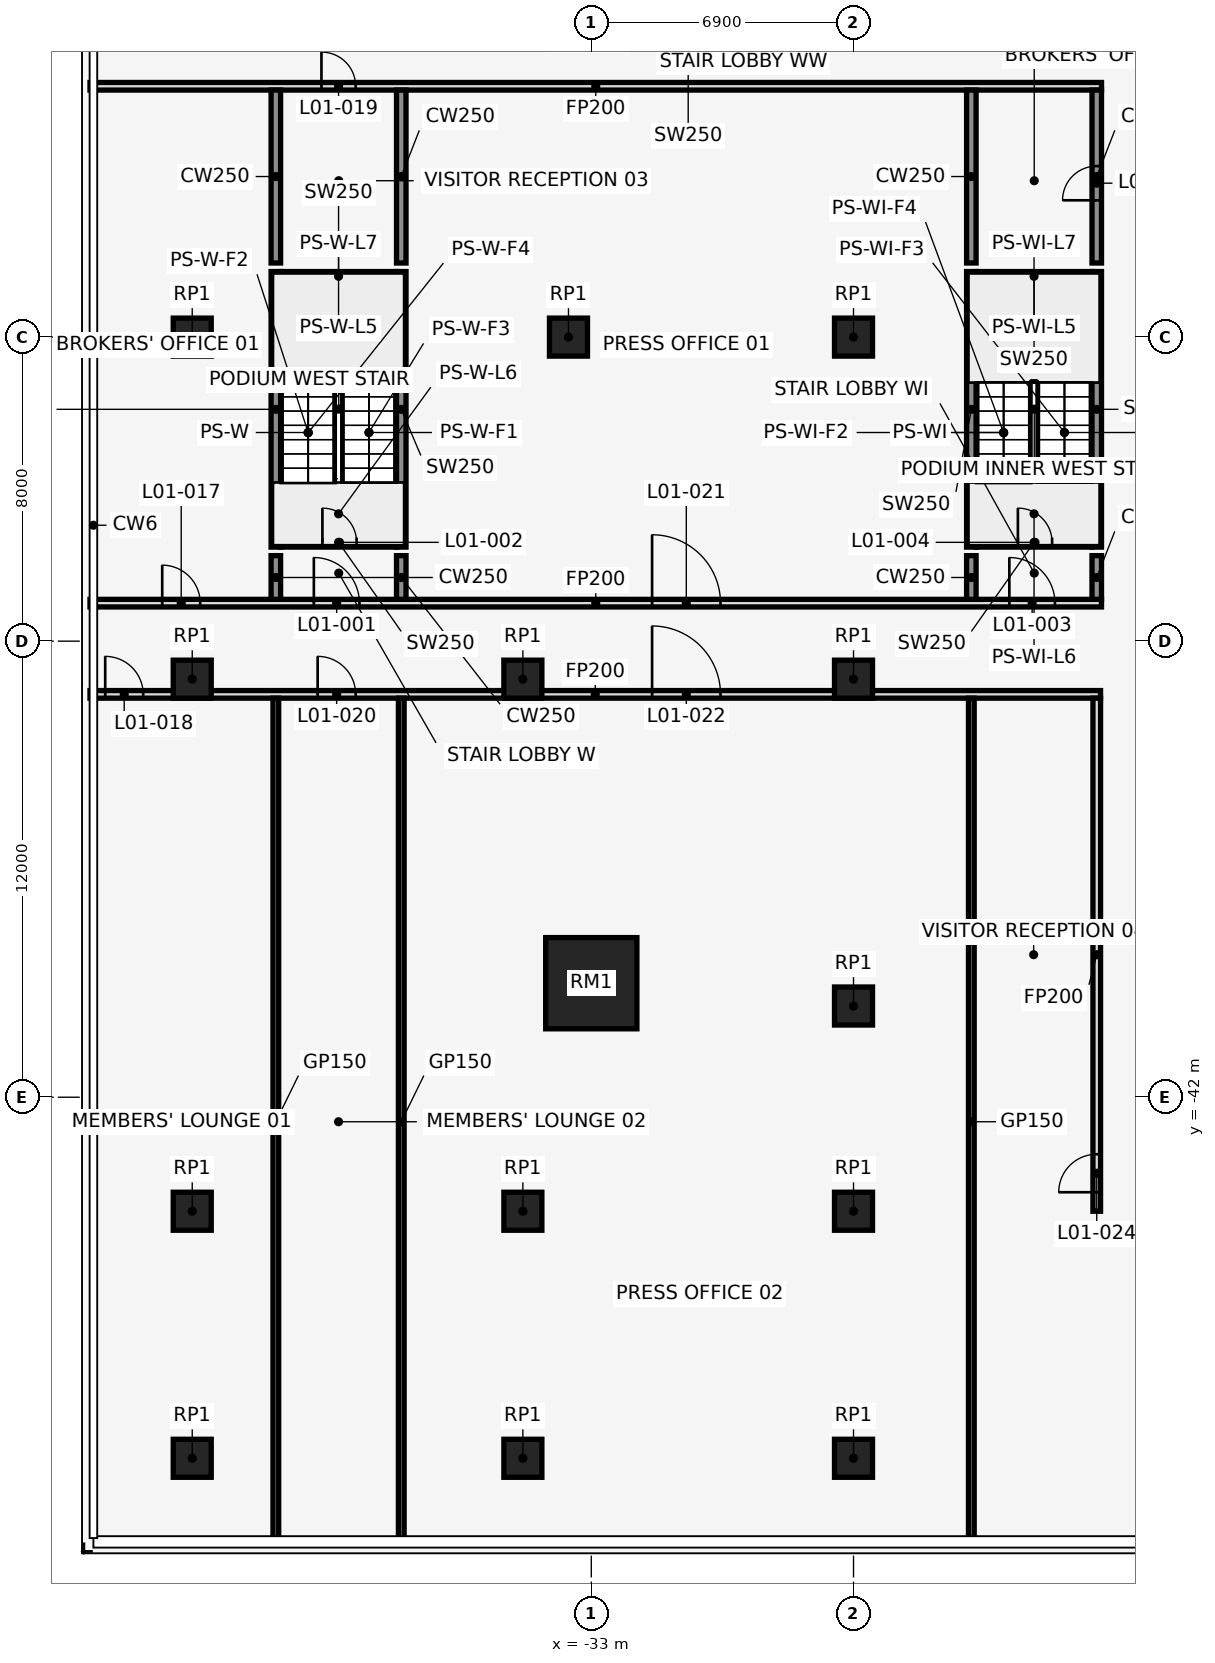
"""IFC4 building model, lengths in metres.
Left out: names, types, materials, properties, quantities, classifications, styles, units other than length and angle.
Written with IfcOpenShell. Run it as: python <this file> out.ifc"""

import sys

from ifc_helpers import new_model, si_unit, direction, frame, frame_2d, origin, origin_2d, place, context, subcontext, project, spatial, rectangle, extrude, element, fill, save


model = new_model("IFC4")
c1 = context("Model", 3, precision=1e-05, world=origin(), true_north=direction((0.0, 1.0)))
c2 = subcontext(c1, "Body", "Model", "MODEL_VIEW")
j1 = project(units=[si_unit("LENGTHUNIT", "METRE"), si_unit("PLANEANGLEUNIT", "RADIAN")], contexts=[c1])
p1 = place(None, origin())
s1 = spatial("IfcSite", under=j1, at=p1, CompositionType="ELEMENT")
p2 = place(p1, origin())
s2 = spatial("IfcBuilding", under=s1, at=p2, CompositionType="ELEMENT")
p3 = place(p2, frame((0.0, 0.0, 8.0)))
s3 = spatial("IfcBuildingStorey", under=s2, at=p3, CompositionType="ELEMENT", Elevation=8.0)
p4 = place(p3, frame((-33.0, -39.0, 0.0), z_axis=(0.0, 0.0, 1.0), x_axis=(1.0, 0.0, 0.0)))
e1 = element("IfcColumn", 1, at=p4, inside=s3, PredefinedType="COLUMN", context=c2, shape_type="SweptSolid", body=[
    extrude(rectangle(XDim=2.4, YDim=2.4, at=origin_2d()), origin(), (0.0, 0.0, 1.0), 6.0),
])
for number, where, z_axis, x_axis in (
    (2, (-26.1, -39.6, 0.0), (0.0, 0.0, 1.0), (1.0, 0.0, 0.0)),
    (3, (-33.6, -22.0, 0.0), (0.0, 0.0, 1.0), (1.0, 0.0, 0.0)),
    (4, (-26.1, -22.0, 0.0), (0.0, 0.0, 1.0), (1.0, 0.0, 0.0)),
    (5, (-43.5, -22.0, 0.0), (0.0, 0.0, 1.0), (1.0, 0.0, 0.0)),
    (6, (-43.5, -31.0, 0.0), (0.0, 0.0, 1.0), (1.0, 0.0, 0.0)),
    (7, (-43.5, -45.0, 0.0), (0.0, 0.0, 1.0), (1.0, 0.0, 0.0)),
    (8, (-43.5, -51.5, 0.0), (0.0, 0.0, 1.0), (1.0, 0.0, 0.0)),
    (9, (-34.8, -31.0, 0.0), (0.0, 0.0, 1.0), (1.0, 0.0, 0.0)),
    (10, (-34.8, -45.0, 0.0), (0.0, 0.0, 1.0), (1.0, 0.0, 0.0)),
    (11, (-34.8, -51.5, 0.0), (0.0, 0.0, 1.0), (1.0, 0.0, 0.0)),
    (12, (-26.1, -31.0, 0.0), (0.0, 0.0, 1.0), (1.0, 0.0, 0.0)),
    (13, (-26.1, -45.0, 0.0), (0.0, 0.0, 1.0), (1.0, 0.0, 0.0)),
    (14, (-26.1, -51.5, 0.0), (0.0, 0.0, 1.0), (1.0, 0.0, 0.0)),
):
    element("IfcColumn", number, at=place(p3, frame(where, z_axis=z_axis, x_axis=x_axis)), inside=s3, PredefinedType="COLUMN", context=c2, shape_type="SweptSolid", body=[
        extrude(rectangle(XDim=1.0, YDim=1.0, at=origin_2d()), origin(), (0.0, 0.0, 1.0), 6.0),
    ])
for number, where, z_axis, x_axis in (
    (15, (-41.3, -27.525, 0.0), (0.0, 0.0, 1.0), (0.0, 1.0, 0.0)),
    (16, (-38.0, -27.525, 0.0), (0.0, 0.0, 1.0), (0.0, 1.0, 0.0)),
):
    element("IfcWall", number, at=place(p3, frame(where, z_axis=z_axis, x_axis=x_axis)), inside=s3, PredefinedType="SHEAR", context=c2, shape_type="SweptSolid", body=[
        extrude(rectangle(XDim=7.25, YDim=0.25, at=frame_2d((3.625, 0.0))), origin(), (0.0, 0.0, 1.0), 6.0),
    ])
p5 = place(p3, frame((-41.175, -27.4, 0.0), z_axis=(0.0, 0.0, 1.0), x_axis=(1.0, 0.0, 0.0)))
e17 = element("IfcWall", 17, at=p5, inside=s3, PredefinedType="SHEAR", context=c2, shape_type="SweptSolid", body=[
    extrude(rectangle(XDim=3.05, YDim=0.25, at=frame_2d((1.525, 0.0))), origin(), (0.0, 0.0, 1.0), 6.0),
])
p6 = place(p5, frame((1.1, 0.0, 0.0)))
e18 = element("IfcOpeningElement", 18, at=p6, cuts=e17, PredefinedType="OPENING", context=c2, shape_type="SweptSolid", body=[
    extrude(rectangle(XDim=0.9, YDim=2.1, at=frame_2d((0.45, 1.05))), frame((0.0, 0.137, 0.0), z_axis=(0.0, -1.0, 0.0), x_axis=(1.0, 0.0, 0.0)), (0.0, 0.0, 1.0), 0.274),
])
p7 = place(p3, frame((-41.175, -20.4, 0.0), z_axis=(0.0, 0.0, 1.0), x_axis=(1.0, 0.0, 0.0)))
e19 = element("IfcWall", 19, at=p7, inside=s3, PredefinedType="SHEAR", context=c2, shape_type="SweptSolid", body=[
    extrude(rectangle(XDim=3.05, YDim=0.25, at=frame_2d((1.525, 0.0))), origin(), (0.0, 0.0, 1.0), 6.0),
])
for number, where, z_axis, x_axis in (
    (20, (-23.0, -27.525, 0.0), (0.0, 0.0, 1.0), (0.0, 1.0, 0.0)),
    (21, (-19.7, -27.525, 0.0), (0.0, 0.0, 1.0), (0.0, 1.0, 0.0)),
):
    element("IfcWall", number, at=place(p3, frame(where, z_axis=z_axis, x_axis=x_axis)), inside=s3, PredefinedType="SHEAR", context=c2, shape_type="SweptSolid", body=[
        extrude(rectangle(XDim=7.25, YDim=0.25, at=frame_2d((3.625, 0.0))), origin(), (0.0, 0.0, 1.0), 6.0),
    ])
p8 = place(p3, frame((-22.875, -27.4, 0.0), z_axis=(0.0, 0.0, 1.0), x_axis=(1.0, 0.0, 0.0)))
e22 = element("IfcWall", 22, at=p8, inside=s3, PredefinedType="SHEAR", context=c2, shape_type="SweptSolid", body=[
    extrude(rectangle(XDim=3.05, YDim=0.25, at=frame_2d((1.525, 0.0))), origin(), (0.0, 0.0, 1.0), 6.0),
])
p9 = place(p8, frame((1.1, 0.0, 0.0)))
e23 = element("IfcOpeningElement", 23, at=p9, cuts=e22, PredefinedType="OPENING", context=c2, shape_type="SweptSolid", body=[
    extrude(rectangle(XDim=0.9, YDim=2.1, at=frame_2d((0.45, 1.05))), frame((0.0, 0.137, 0.0), z_axis=(0.0, -1.0, 0.0), x_axis=(1.0, 0.0, 0.0)), (0.0, 0.0, 1.0), 0.274),
])
p10 = place(p3, frame((-22.875, -20.4, 0.0), z_axis=(0.0, 0.0, 1.0), x_axis=(1.0, 0.0, 0.0)))
e24 = element("IfcWall", 24, at=p10, inside=s3, PredefinedType="SHEAR", context=c2, shape_type="SweptSolid", body=[
    extrude(rectangle(XDim=3.05, YDim=0.25, at=frame_2d((1.525, 0.0))), origin(), (0.0, 0.0, 1.0), 6.0),
])
p11 = place(p3, frame((-46.19, -31.4, 0.0), z_axis=(0.0, 0.0, 1.0), x_axis=(1.0, 0.0, 0.0)))
e25 = element("IfcWall", 25, at=p11, inside=s3, PredefinedType="PARTITIONING", context=c2, shape_type="SweptSolid", body=[
    extrude(rectangle(XDim=26.59, YDim=0.2, at=frame_2d((13.295, 0.0))), origin(), (0.0, 0.0, 1.0), 5.7),
])
p12 = place(p11, frame((0.4, 0.0, 0.0)))
e26 = element("IfcOpeningElement", 26, at=p12, cuts=e25, PredefinedType="OPENING", context=c2, shape_type="SweptSolid", body=[
    extrude(rectangle(XDim=1.0, YDim=2.1, at=frame_2d((0.5, 1.05))), frame((0.0, 0.112, 0.0), z_axis=(0.0, -1.0, 0.0), x_axis=(1.0, 0.0, 0.0)), (0.0, 0.0, 1.0), 0.224),
])
p13 = place(p11, frame((5.99, 0.0, 0.0)))
e27 = element("IfcOpeningElement", 27, at=p13, cuts=e25, PredefinedType="OPENING", context=c2, shape_type="SweptSolid", body=[
    extrude(rectangle(XDim=1.0, YDim=2.1, at=frame_2d((0.5, 1.05))), frame((0.0, 0.112, 0.0), z_axis=(0.0, -1.0, 0.0), x_axis=(1.0, 0.0, 0.0)), (0.0, 0.0, 1.0), 0.224),
])
p14 = place(p11, frame((14.79, 0.0, 0.0)))
e28 = element("IfcOpeningElement", 28, at=p14, cuts=e25, PredefinedType="OPENING", context=c2, shape_type="SweptSolid", body=[
    extrude(rectangle(XDim=1.8, YDim=2.1, at=frame_2d((0.9, 1.05))), frame((0.0, 0.112, 0.0), z_axis=(0.0, -1.0, 0.0), x_axis=(1.0, 0.0, 0.0)), (0.0, 0.0, 1.0), 0.224),
])
p15 = place(p3, frame((-46.19, -29.0, 0.0), z_axis=(0.0, 0.0, 1.0), x_axis=(1.0, 0.0, 0.0)))
e29 = element("IfcWall", 29, at=p15, inside=s3, PredefinedType="PARTITIONING", context=c2, shape_type="SweptSolid", body=[
    extrude(rectangle(XDim=26.615, YDim=0.2, at=frame_2d((13.308, 0.0))), origin(), (0.0, 0.0, 1.0), 5.7),
])
p16 = place(p15, frame((5.89, 0.0, 0.0)))
e30 = element("IfcOpeningElement", 30, at=p16, cuts=e29, PredefinedType="OPENING", context=c2, shape_type="SweptSolid", body=[
    extrude(rectangle(XDim=1.2, YDim=2.1, at=frame_2d((0.6, 1.05))), frame((0.0, 0.112, 0.0), z_axis=(0.0, -1.0, 0.0), x_axis=(1.0, 0.0, 0.0)), (0.0, 0.0, 1.0), 0.224),
])
p17 = place(p15, frame((24.19, 0.0, 0.0)))
e31 = element("IfcOpeningElement", 31, at=p17, cuts=e29, PredefinedType="OPENING", context=c2, shape_type="SweptSolid", body=[
    extrude(rectangle(XDim=1.2, YDim=2.1, at=frame_2d((0.6, 1.05))), frame((0.0, 0.112, 0.0), z_axis=(0.0, -1.0, 0.0), x_axis=(1.0, 0.0, 0.0)), (0.0, 0.0, 1.0), 0.224),
])
p18 = place(p15, frame((1.9, 0.0, 0.0)))
e32 = element("IfcOpeningElement", 32, at=p18, cuts=e29, PredefinedType="OPENING", context=c2, shape_type="SweptSolid", body=[
    extrude(rectangle(XDim=1.0, YDim=2.1, at=frame_2d((0.5, 1.05))), frame((0.0, 0.112, 0.0), z_axis=(0.0, -1.0, 0.0), x_axis=(1.0, 0.0, 0.0)), (0.0, 0.0, 1.0), 0.224),
])
p19 = place(p15, frame((14.79, 0.0, 0.0)))
e33 = element("IfcOpeningElement", 33, at=p19, cuts=e29, PredefinedType="OPENING", context=c2, shape_type="SweptSolid", body=[
    extrude(rectangle(XDim=1.8, YDim=2.1, at=frame_2d((0.9, 1.05))), frame((0.0, 0.112, 0.0), z_axis=(0.0, -1.0, 0.0), x_axis=(1.0, 0.0, 0.0)), (0.0, 0.0, 1.0), 0.224),
])
p20 = place(p3, frame((-46.19, -15.4, 0.0), z_axis=(0.0, 0.0, 1.0), x_axis=(1.0, 0.0, 0.0)))
e34 = element("IfcWall", 34, at=p20, inside=s3, PredefinedType="PARTITIONING", context=c2, shape_type="SweptSolid", body=[
    extrude(rectangle(XDim=26.615, YDim=0.2, at=frame_2d((13.308, 0.0))), origin(), (0.0, 0.0, 1.0), 5.7),
])
p21 = place(p20, frame((6.09, 0.0, 0.0)))
e35 = element("IfcOpeningElement", 35, at=p21, cuts=e34, PredefinedType="OPENING", context=c2, shape_type="SweptSolid", body=[
    extrude(rectangle(XDim=0.9, YDim=2.1, at=frame_2d((0.45, 1.05))), frame((0.0, 0.112, 0.0), z_axis=(0.0, -1.0, 0.0), x_axis=(1.0, 0.0, 0.0)), (0.0, 0.0, 1.0), 0.224),
])
p22 = place(p3, frame((-41.3, -53.79, 0.0), z_axis=(0.0, 0.0, 1.0), x_axis=(0.0, 1.0, 0.0)))
e36 = element("IfcWall", 36, at=p22, inside=s3, PredefinedType="PARTITIONING", context=c2, shape_type="SweptSolid", body=[
    extrude(rectangle(XDim=22.29, YDim=0.15, at=frame_2d((11.145, 0.0))), origin(), (0.0, 0.0, 1.0), 5.7),
])
p23 = place(p3, frame((-41.3, -28.9, 0.0), z_axis=(0.0, 0.0, 1.0), x_axis=(0.0, 1.0, 0.0)))
e37 = element("IfcWall", 37, at=p23, inside=s3, PredefinedType="SHEAR", context=c2, shape_type="SweptSolid", body=[
    extrude(rectangle(XDim=1.15, YDim=0.25, at=frame_2d((0.575, 0.0))), origin(), (0.0, 0.0, 1.0), 6.0),
])
p24 = place(p3, frame((-41.3, -20.05, 0.0), z_axis=(0.0, 0.0, 1.0), x_axis=(0.0, 1.0, 0.0)))
e38 = element("IfcWall", 38, at=p24, inside=s3, PredefinedType="SHEAR", context=c2, shape_type="SweptSolid", body=[
    extrude(rectangle(XDim=4.55, YDim=0.25, at=frame_2d((2.275, 0.0))), origin(), (0.0, 0.0, 1.0), 6.0),
])
p25 = place(p3, frame((-38.0, -53.79, 0.0), z_axis=(0.0, 0.0, 1.0), x_axis=(0.0, 1.0, 0.0)))
e39 = element("IfcWall", 39, at=p25, inside=s3, PredefinedType="PARTITIONING", context=c2, shape_type="SweptSolid", body=[
    extrude(rectangle(XDim=22.29, YDim=0.15, at=frame_2d((11.145, 0.0))), origin(), (0.0, 0.0, 1.0), 5.7),
])
p26 = place(p3, frame((-38.0, -28.9, 0.0), z_axis=(0.0, 0.0, 1.0), x_axis=(0.0, 1.0, 0.0)))
e40 = element("IfcWall", 40, at=p26, inside=s3, PredefinedType="SHEAR", context=c2, shape_type="SweptSolid", body=[
    extrude(rectangle(XDim=1.15, YDim=0.25, at=frame_2d((0.575, 0.0))), origin(), (0.0, 0.0, 1.0), 6.0),
])
p27 = place(p3, frame((-38.0, -20.05, 0.0), z_axis=(0.0, 0.0, 1.0), x_axis=(0.0, 1.0, 0.0)))
e41 = element("IfcWall", 41, at=p27, inside=s3, PredefinedType="SHEAR", context=c2, shape_type="SweptSolid", body=[
    extrude(rectangle(XDim=4.55, YDim=0.25, at=frame_2d((2.275, 0.0))), origin(), (0.0, 0.0, 1.0), 6.0),
])
p28 = place(p3, frame((-23.0, -53.79, 0.0), z_axis=(0.0, 0.0, 1.0), x_axis=(0.0, 1.0, 0.0)))
e42 = element("IfcWall", 42, at=p28, inside=s3, PredefinedType="PARTITIONING", context=c2, shape_type="SweptSolid", body=[
    extrude(rectangle(XDim=22.29, YDim=0.15, at=frame_2d((11.145, 0.0))), origin(), (0.0, 0.0, 1.0), 5.7),
])
p29 = place(p3, frame((-23.0, -28.9, 0.0), z_axis=(0.0, 0.0, 1.0), x_axis=(0.0, 1.0, 0.0)))
e43 = element("IfcWall", 43, at=p29, inside=s3, PredefinedType="SHEAR", context=c2, shape_type="SweptSolid", body=[
    extrude(rectangle(XDim=1.15, YDim=0.25, at=frame_2d((0.575, 0.0))), origin(), (0.0, 0.0, 1.0), 6.0),
])
p30 = place(p3, frame((-23.0, -20.05, 0.0), z_axis=(0.0, 0.0, 1.0), x_axis=(0.0, 1.0, 0.0)))
e44 = element("IfcWall", 44, at=p30, inside=s3, PredefinedType="SHEAR", context=c2, shape_type="SweptSolid", body=[
    extrude(rectangle(XDim=4.55, YDim=0.25, at=frame_2d((2.275, 0.0))), origin(), (0.0, 0.0, 1.0), 6.0),
])
p31 = place(p3, frame((-19.7, -45.0, 0.0), z_axis=(0.0, 0.0, 1.0), x_axis=(0.0, 1.0, 0.0)))
e45 = element("IfcWall", 45, at=p31, inside=s3, PredefinedType="PARTITIONING", context=c2, shape_type="SweptSolid", body=[
    extrude(rectangle(XDim=13.5, YDim=0.2, at=frame_2d((6.75, 0.0))), origin(), (0.0, 0.0, 1.0), 5.7),
])
p32 = place(p31, frame((0.5, 0.0, 0.0)))
e46 = element("IfcOpeningElement", 46, at=p32, cuts=e45, PredefinedType="OPENING", context=c2, shape_type="SweptSolid", body=[
    extrude(rectangle(XDim=1.0, YDim=2.1, at=frame_2d((0.5, 1.05))), frame((0.0, 0.112, 0.0), z_axis=(0.0, -1.0, 0.0), x_axis=(1.0, 0.0, 0.0)), (0.0, 0.0, 1.0), 0.224),
])
p33 = place(p3, frame((-19.7, -28.9, 0.0), z_axis=(0.0, 0.0, 1.0), x_axis=(0.0, 1.0, 0.0)))
e47 = element("IfcWall", 47, at=p33, inside=s3, PredefinedType="SHEAR", context=c2, shape_type="SweptSolid", body=[
    extrude(rectangle(XDim=1.15, YDim=0.25, at=frame_2d((0.575, 0.0))), origin(), (0.0, 0.0, 1.0), 6.0),
])
p34 = place(p3, frame((-19.7, -20.05, 0.0), z_axis=(0.0, 0.0, 1.0), x_axis=(0.0, 1.0, 0.0)))
e48 = element("IfcWall", 48, at=p34, inside=s3, PredefinedType="SHEAR", context=c2, shape_type="SweptSolid", body=[
    extrude(rectangle(XDim=4.55, YDim=0.25, at=frame_2d((2.275, 0.0))), origin(), (0.0, 0.0, 1.0), 6.0),
])
p35 = place(p34, frame((1.65, 0.0, 0.0)))
e49 = element("IfcOpeningElement", 49, at=p35, cuts=e48, PredefinedType="OPENING", context=c2, shape_type="SweptSolid", body=[
    extrude(rectangle(XDim=0.9, YDim=2.1, at=frame_2d((0.45, 1.05))), frame((0.0, 0.137, 0.0), z_axis=(0.0, -1.0, 0.0), x_axis=(1.0, 0.0, 0.0)), (0.0, 0.0, 1.0), 0.274),
])
p36 = place(p16, origin())
e50 = element("IfcDoor", 50, at=p36, inside=s3, OperationType="SINGLE_SWING_LEFT", PredefinedType="DOOR", context=c2, shape_type="SweptSolid", body=[
    extrude(rectangle(XDim=1.2, YDim=2.1, at=frame_2d((0.6, 1.05))), frame((0.0, 0.025, 0.0), z_axis=(0.0, -1.0, 0.0), x_axis=(1.0, 0.0, 0.0)), (0.0, 0.0, 1.0), 0.05),
])
fill(e30, e50)
p37 = place(p6, origin())
e51 = element("IfcDoor", 51, at=p37, inside=s3, OperationType="SINGLE_SWING_LEFT", PredefinedType="DOOR", context=c2, shape_type="SweptSolid", body=[
    extrude(rectangle(XDim=0.9, YDim=2.1, at=frame_2d((0.45, 1.05))), frame((0.0, 0.025, 0.0), z_axis=(0.0, -1.0, 0.0), x_axis=(1.0, 0.0, 0.0)), (0.0, 0.0, 1.0), 0.05),
])
fill(e18, e51)
p38 = place(p17, origin())
e52 = element("IfcDoor", 52, at=p38, inside=s3, OperationType="SINGLE_SWING_RIGHT", PredefinedType="DOOR", context=c2, shape_type="SweptSolid", body=[
    extrude(rectangle(XDim=1.2, YDim=2.1, at=frame_2d((0.6, 1.05))), frame((0.0, 0.025, 0.0), z_axis=(0.0, -1.0, 0.0), x_axis=(1.0, 0.0, 0.0)), (0.0, 0.0, 1.0), 0.05),
])
fill(e31, e52)
p39 = place(p9, origin())
e53 = element("IfcDoor", 53, at=p39, inside=s3, OperationType="SINGLE_SWING_LEFT", PredefinedType="DOOR", context=c2, shape_type="SweptSolid", body=[
    extrude(rectangle(XDim=0.9, YDim=2.1, at=frame_2d((0.45, 1.05))), frame((0.0, 0.025, 0.0), z_axis=(0.0, -1.0, 0.0), x_axis=(1.0, 0.0, 0.0)), (0.0, 0.0, 1.0), 0.05),
])
fill(e23, e53)
p40 = place(p18, origin())
e54 = element("IfcDoor", 54, at=p40, inside=s3, OperationType="SINGLE_SWING_LEFT", PredefinedType="DOOR", context=c2, shape_type="SweptSolid", body=[
    extrude(rectangle(XDim=1.0, YDim=2.1, at=frame_2d((0.5, 1.05))), frame((0.0, 0.025, 0.0), z_axis=(0.0, -1.0, 0.0), x_axis=(1.0, 0.0, 0.0)), (0.0, 0.0, 1.0), 0.05),
])
fill(e32, e54)
p41 = place(p12, frame((1.0, 0.0, 0.0), z_axis=(0.0, 0.0, 1.0), x_axis=(-1.0, 0.0, 0.0)))
e55 = element("IfcDoor", 55, at=p41, inside=s3, OperationType="SINGLE_SWING_RIGHT", PredefinedType="DOOR", context=c2, shape_type="SweptSolid", body=[
    extrude(rectangle(XDim=1.0, YDim=2.1, at=frame_2d((0.5, 1.05))), frame((0.0, 0.025, 0.0), z_axis=(0.0, -1.0, 0.0), x_axis=(1.0, 0.0, 0.0)), (0.0, 0.0, 1.0), 0.05),
])
fill(e26, e55)
p42 = place(p21, frame((0.9, 0.0, 0.0), z_axis=(0.0, 0.0, 1.0), x_axis=(-1.0, 0.0, 0.0)))
e56 = element("IfcDoor", 56, at=p42, inside=s3, OperationType="SINGLE_SWING_LEFT", PredefinedType="DOOR", context=c2, shape_type="SweptSolid", body=[
    extrude(rectangle(XDim=0.9, YDim=2.1, at=frame_2d((0.45, 1.05))), frame((0.0, 0.025, 0.0), z_axis=(0.0, -1.0, 0.0), x_axis=(1.0, 0.0, 0.0)), (0.0, 0.0, 1.0), 0.05),
])
fill(e35, e56)
p43 = place(p13, frame((1.0, 0.0, 0.0), z_axis=(0.0, 0.0, 1.0), x_axis=(-1.0, 0.0, 0.0)))
e57 = element("IfcDoor", 57, at=p43, inside=s3, OperationType="SINGLE_SWING_RIGHT", PredefinedType="DOOR", context=c2, shape_type="SweptSolid", body=[
    extrude(rectangle(XDim=1.0, YDim=2.1, at=frame_2d((0.5, 1.05))), frame((0.0, 0.025, 0.0), z_axis=(0.0, -1.0, 0.0), x_axis=(1.0, 0.0, 0.0)), (0.0, 0.0, 1.0), 0.05),
])
fill(e27, e57)
p44 = place(p19, origin())
e58 = element("IfcDoor", 58, at=p44, inside=s3, OperationType="SINGLE_SWING_LEFT", PredefinedType="DOOR", context=c2, shape_type="SweptSolid", body=[
    extrude(rectangle(XDim=1.8, YDim=2.1, at=frame_2d((0.9, 1.05))), frame((0.0, 0.025, 0.0), z_axis=(0.0, -1.0, 0.0), x_axis=(1.0, 0.0, 0.0)), (0.0, 0.0, 1.0), 0.05),
])
fill(e33, e58)
p45 = place(p14, origin())
e59 = element("IfcDoor", 59, at=p45, inside=s3, OperationType="SINGLE_SWING_LEFT", PredefinedType="DOOR", context=c2, shape_type="SweptSolid", body=[
    extrude(rectangle(XDim=1.8, YDim=2.1, at=frame_2d((0.9, 1.05))), frame((0.0, 0.025, 0.0), z_axis=(0.0, -1.0, 0.0), x_axis=(1.0, 0.0, 0.0)), (0.0, 0.0, 1.0), 0.05),
])
fill(e28, e59)
p46 = place(p35, origin())
e60 = element("IfcDoor", 60, at=p46, inside=s3, OperationType="SINGLE_SWING_LEFT", PredefinedType="DOOR", context=c2, shape_type="SweptSolid", body=[
    extrude(rectangle(XDim=0.9, YDim=2.1, at=frame_2d((0.45, 1.05))), frame((0.0, 0.025, 0.0), z_axis=(0.0, -1.0, 0.0), x_axis=(1.0, 0.0, 0.0)), (0.0, 0.0, 1.0), 0.05),
])
fill(e49, e60)
p47 = place(p32, origin())
e61 = element("IfcDoor", 61, at=p47, inside=s3, OperationType="SINGLE_SWING_RIGHT", PredefinedType="DOOR", context=c2, shape_type="SweptSolid", body=[
    extrude(rectangle(XDim=1.0, YDim=2.1, at=frame_2d((0.5, 1.05))), frame((0.0, 0.025, 0.0), z_axis=(0.0, -1.0, 0.0), x_axis=(1.0, 0.0, 0.0)), (0.0, 0.0, 1.0), 0.05),
])
fill(e46, e61)
save(model, sys.argv[1])
